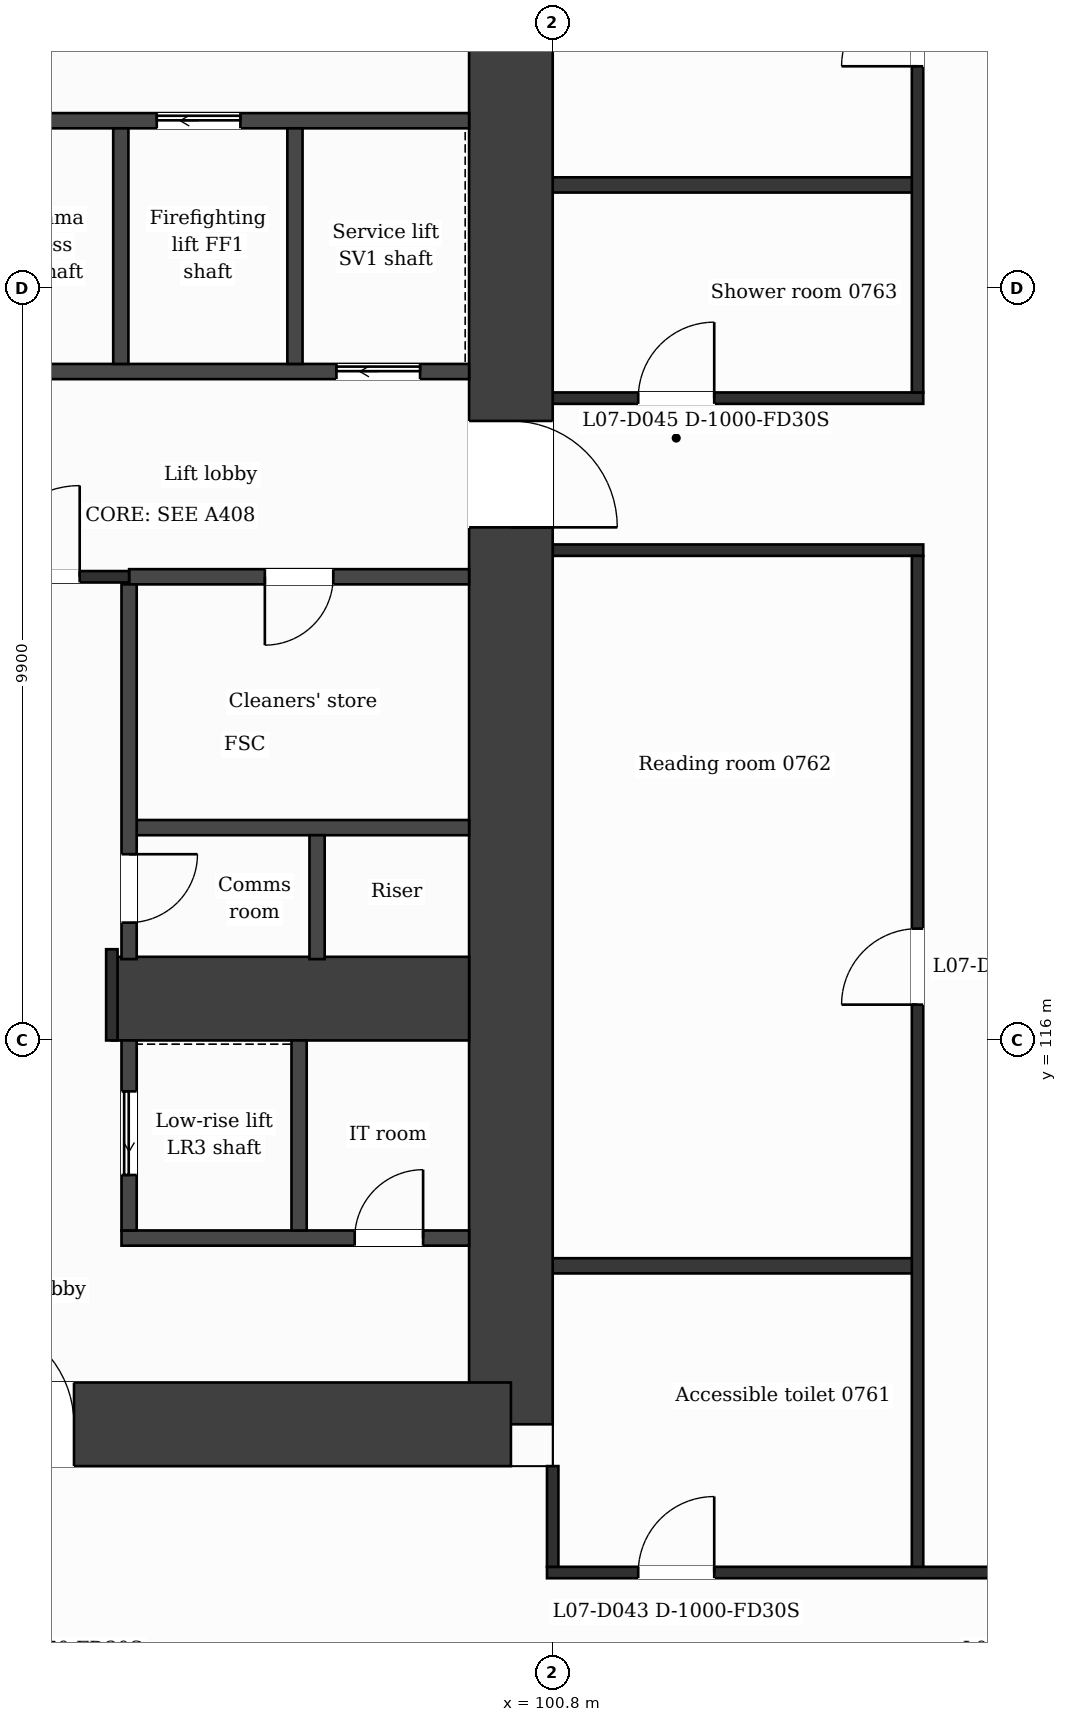
"""IFC4 building model, lengths in metres.
Left out: names, types, materials, properties, quantities, classifications, styles, units other than length and angle.
Written with IfcOpenShell. Run it as: python <this file> out.ifc"""

import sys

from ifc_helpers import new_model, si_unit, direction, frame, frame_2d, origin, place, context, subcontext, project, spatial, rectangle, extrude, element, fill, save


model = new_model("IFC4")
c1 = context("Model", 3, precision=1e-05, world=origin(), true_north=direction((0.0, 1.0)))
c2 = subcontext(c1, "Body", "Model", "MODEL_VIEW")
j1 = project(units=[si_unit("LENGTHUNIT", "METRE"), si_unit("PLANEANGLEUNIT", "RADIAN")], contexts=[c1])
p1 = place(None, origin())
s1 = spatial("IfcSite", under=j1, at=p1, CompositionType="ELEMENT")
p2 = place(p1, origin())
s2 = spatial("IfcBuilding", under=s1, at=p2, CompositionType="ELEMENT")
p3 = place(p2, frame((0.0, 0.0, 42.5)))
s3 = spatial("IfcBuildingStorey", under=s2, at=p3, CompositionType="ELEMENT", Elevation=42.5)
p4 = place(p3, frame((100.25, 131.85, 0.0), z_axis=(0.0, 0.0, 1.0), x_axis=(0.0, -1.0, 0.0)))
e1 = element("IfcWall", 1, at=p4, inside=s3, PredefinedType="SHEAR", context=c2, shape_type="SweptSolid", body=[
    extrude(rectangle(XDim=20.9, YDim=1.1, at=frame_2d((10.45, 0.0))), origin(), (0.0, 0.0, 1.0), 3.5),
])
p5 = place(p4, frame((7.7, 0.0, 0.0)))
e2 = element("IfcOpeningElement", 2, at=p5, cuts=e1, PredefinedType="OPENING", context=c2, shape_type="SweptSolid", body=[
    extrude(rectangle(XDim=1.4, YDim=2.1, at=frame_2d((0.7, 1.05))), frame((0.0, 0.56, 0.0), z_axis=(0.0, -1.0, 0.0), x_axis=(1.0, 0.0, 0.0)), (0.0, 0.0, 1.0), 1.12),
])
p6 = place(p3, frame((100.25, 110.95, 0.0), z_axis=(0.0, 0.0, 1.0), x_axis=(-1.0, 0.0, 0.0)))
e3 = element("IfcWall", 3, at=p6, inside=s3, PredefinedType="SHEAR", context=c2, shape_type="SweptSolid", body=[
    extrude(rectangle(XDim=13.952, YDim=1.1, at=frame_2d((6.976, 0.0))), origin(), (0.0, 0.0, 1.0), 3.5),
])
p7 = place(p6, frame((5.748, 0.0, 0.0)))
e4 = element("IfcOpeningElement", 4, at=p7, cuts=e3, PredefinedType="OPENING", context=c2, shape_type="SweptSolid", body=[
    extrude(rectangle(XDim=1.4, YDim=2.1, at=frame_2d((0.7, 1.05))), frame((0.0, 0.56, 0.0), z_axis=(0.0, -1.0, 0.0), x_axis=(1.0, 0.0, 0.0)), (0.0, 0.0, 1.0), 1.12),
])
p8 = place(p3, frame((95.0, 116.55, 0.0), z_axis=(0.0, 0.0, 1.0), x_axis=(1.0, 0.0, 0.0)))
e5 = element("IfcWall", 5, at=p8, inside=s3, PredefinedType="SHEAR", context=c2, shape_type="SweptSolid", body=[
    extrude(rectangle(XDim=4.7, YDim=1.1, at=frame_2d((2.35, 0.0))), origin(), (0.0, 0.0, 1.0), 3.5),
])
p9 = place(p3, frame((100.725, 109.0, 0.0), z_axis=(0.0, 0.0, 1.0), x_axis=(1.0, 0.0, 0.0)))
e6 = element("IfcWall", 6, at=p9, inside=s3, PredefinedType="PARTITIONING", context=c2, shape_type="SweptSolid", body=[
    extrude(rectangle(XDim=25.35, YDim=0.15, at=frame_2d((12.675, 0.0))), origin(), (0.0, 0.0, 1.0), 3.18),
])
p10 = place(p9, frame((1.2, 0.0, 0.0)))
e7 = element("IfcOpeningElement", 7, at=p10, cuts=e6, PredefinedType="OPENING", context=c2, shape_type="SweptSolid", body=[
    extrude(rectangle(XDim=1.0, YDim=2.1, at=frame_2d((0.5, 1.05))), frame((0.0, 0.085, 0.0), z_axis=(0.0, -1.0, 0.0), x_axis=(1.0, 0.0, 0.0)), (0.0, 0.0, 1.0), 0.17),
])
p11 = place(p9, frame((12.845, 0.0, 0.0)))
e8 = element("IfcOpeningElement", 8, at=p11, cuts=e6, PredefinedType="OPENING", context=c2, shape_type="SweptSolid", body=[
    extrude(rectangle(XDim=1.0, YDim=2.1, at=frame_2d((0.5, 1.05))), frame((0.0, 0.085, 0.0), z_axis=(0.0, -1.0, 0.0), x_axis=(1.0, 0.0, 0.0)), (0.0, 0.0, 1.0), 0.17),
])
p12 = place(p9, frame((23.15, 0.0, 0.0)))
e9 = element("IfcOpeningElement", 9, at=p12, cuts=e6, PredefinedType="OPENING", context=c2, shape_type="SweptSolid", body=[
    extrude(rectangle(XDim=1.0, YDim=2.1, at=frame_2d((0.5, 1.05))), frame((0.0, 0.085, 0.0), z_axis=(0.0, -1.0, 0.0), x_axis=(1.0, 0.0, 0.0)), (0.0, 0.0, 1.0), 0.17),
])
p13 = place(p3, frame((100.8, 113.035, 0.0), z_axis=(0.0, 0.0, 1.0), x_axis=(1.0, 0.0, 0.0)))
e10 = element("IfcWall", 10, at=p13, inside=s3, PredefinedType="PARTITIONING", context=c2, shape_type="SweptSolid", body=[
    extrude(rectangle(XDim=4.8, YDim=0.2, at=frame_2d((2.4, 0.0))), origin(), (0.0, 0.0, 1.0), 3.18),
])
p14 = place(p3, frame((95.127, 113.4, 0.0), z_axis=(0.0, 0.0, 1.0), x_axis=(1.0, 0.0, 0.0)))
e11 = element("IfcWall", 11, at=p14, inside=s3, PredefinedType="PARTITIONING", context=c2, shape_type="SweptSolid", body=[
    extrude(rectangle(XDim=4.573, YDim=0.2, at=frame_2d((2.287, 0.0))), origin(), (0.0, 0.0, 1.0), 3.18),
])
p15 = place(p14, frame((3.068, 0.0, 0.0)))
e12 = element("IfcOpeningElement", 12, at=p15, cuts=e11, PredefinedType="OPENING", context=c2, shape_type="SweptSolid", body=[
    extrude(rectangle(XDim=0.9, YDim=2.1, at=frame_2d((0.45, 1.05))), frame((0.0, 0.11, 0.0), z_axis=(0.0, -1.0, 0.0), x_axis=(1.0, 0.0, 0.0)), (0.0, 0.0, 1.0), 0.22),
])
p16 = place(p3, frame((95.227, 118.8, 0.0), z_axis=(0.0, 0.0, 1.0), x_axis=(1.0, 0.0, 0.0)))
e13 = element("IfcWall", 13, at=p16, inside=s3, PredefinedType="PARTITIONING", context=c2, shape_type="SweptSolid", body=[
    extrude(rectangle(XDim=4.473, YDim=0.2, at=frame_2d((2.236, 0.0))), origin(), (0.0, 0.0, 1.0), 3.18),
])
p17 = place(p3, frame((95.227, 122.1, 0.0), z_axis=(0.0, 0.0, 1.0), x_axis=(1.0, 0.0, 0.0)))
e14 = element("IfcWall", 14, at=p17, inside=s3, PredefinedType="PARTITIONING", context=c2, shape_type="SweptSolid", body=[
    extrude(rectangle(XDim=4.473, YDim=0.2, at=frame_2d((2.236, 0.0))), origin(), (0.0, 0.0, 1.0), 3.18),
])
p18 = place(p17, frame((1.786, 0.0, 0.0)))
e15 = element("IfcOpeningElement", 15, at=p18, cuts=e14, PredefinedType="OPENING", context=c2, shape_type="SweptSolid", body=[
    extrude(rectangle(XDim=0.9, YDim=2.1, at=frame_2d((0.45, 1.05))), frame((0.0, 0.11, 0.0), z_axis=(0.0, -1.0, 0.0), x_axis=(1.0, 0.0, 0.0)), (0.0, 0.0, 1.0), 0.22),
])
p19 = place(p3, frame((92.827, 122.1, 0.0), z_axis=(0.0, 0.0, 1.0), x_axis=(1.0, 0.0, 0.0)))
e16 = element("IfcWall", 16, at=p19, inside=s3, PredefinedType="PARTITIONING", context=c2, shape_type="SweptSolid", body=[
    extrude(rectangle(XDim=2.4, YDim=0.15, at=frame_2d((1.2, 0.0))), origin(), (0.0, 0.0, 1.0), 3.18),
])
p20 = place(p19, frame((0.55, 0.0, 0.0)))
e17 = element("IfcOpeningElement", 17, at=p20, cuts=e16, PredefinedType="OPENING", context=c2, shape_type="SweptSolid", body=[
    extrude(rectangle(XDim=1.2, YDim=2.1, at=frame_2d((0.6, 1.05))), frame((0.0, 0.085, 0.0), z_axis=(0.0, -1.0, 0.0), x_axis=(1.0, 0.0, 0.0)), (0.0, 0.0, 1.0), 0.17),
])
p21 = place(p3, frame((100.8, 122.45, 0.0), z_axis=(0.0, 0.0, 1.0), x_axis=(1.0, 0.0, 0.0)))
e18 = element("IfcWall", 18, at=p21, inside=s3, PredefinedType="PARTITIONING", context=c2, shape_type="SweptSolid", body=[
    extrude(rectangle(XDim=4.875, YDim=0.15, at=frame_2d((2.438, 0.0))), origin(), (0.0, 0.0, 1.0), 3.18),
])
p22 = place(p3, frame((100.8, 124.45, 0.0), z_axis=(0.0, 0.0, 1.0), x_axis=(1.0, 0.0, 0.0)))
e19 = element("IfcWall", 19, at=p22, inside=s3, PredefinedType="PARTITIONING", context=c2, shape_type="SweptSolid", body=[
    extrude(rectangle(XDim=4.875, YDim=0.15, at=frame_2d((2.438, 0.0))), origin(), (0.0, 0.0, 1.0), 3.18),
])
p23 = place(p22, frame((1.125, 0.0, 0.0)))
e20 = element("IfcOpeningElement", 20, at=p23, cuts=e19, PredefinedType="OPENING", context=c2, shape_type="SweptSolid", body=[
    extrude(rectangle(XDim=1.0, YDim=2.1, at=frame_2d((0.5, 1.05))), frame((0.0, 0.085, 0.0), z_axis=(0.0, -1.0, 0.0), x_axis=(1.0, 0.0, 0.0)), (0.0, 0.0, 1.0), 0.17),
])
p24 = place(p3, frame((92.702, 124.8, 0.0), z_axis=(0.0, 0.0, 1.0), x_axis=(1.0, 0.0, 0.0)))
e21 = element("IfcWall", 21, at=p24, inside=s3, PredefinedType="PARTITIONING", context=c2, shape_type="SweptSolid", body=[
    extrude(rectangle(XDim=6.998, YDim=0.2, at=frame_2d((3.499, 0.0))), origin(), (0.0, 0.0, 1.0), 3.18),
])
p25 = place(p24, frame((5.253, 0.0, 0.0)))
e22 = element("IfcOpeningElement", 22, at=p25, cuts=e21, PredefinedType="OPENING", context=c2, shape_type="SweptSolid", body=[
    extrude(rectangle(XDim=1.1, YDim=2.1, at=frame_2d((0.55, 1.05))), frame((0.0, 0.11, 0.0), z_axis=(0.0, -1.0, 0.0), x_axis=(1.0, 0.0, 0.0)), (0.0, 0.0, 1.0), 0.22),
])
p26 = place(p3, frame((100.8, 127.255, 0.0), z_axis=(0.0, 0.0, 1.0), x_axis=(1.0, 0.0, 0.0)))
e23 = element("IfcWall", 23, at=p26, inside=s3, PredefinedType="PARTITIONING", context=c2, shape_type="SweptSolid", body=[
    extrude(rectangle(XDim=4.8, YDim=0.2, at=frame_2d((2.4, 0.0))), origin(), (0.0, 0.0, 1.0), 3.18),
])
p27 = place(p3, frame((92.827, 128.1, 0.0), z_axis=(0.0, 0.0, 1.0), x_axis=(1.0, 0.0, 0.0)))
e24 = element("IfcWall", 24, at=p27, inside=s3, PredefinedType="PARTITIONING", context=c2, shape_type="SweptSolid", body=[
    extrude(rectangle(XDim=6.873, YDim=0.2, at=frame_2d((3.437, 0.0))), origin(), (0.0, 0.0, 1.0), 3.18),
])
p28 = place(p27, frame((2.764, 0.0, 0.0)))
e25 = element("IfcOpeningElement", 25, at=p28, cuts=e24, PredefinedType="OPENING", context=c2, shape_type="SweptSolid", body=[
    extrude(rectangle(XDim=1.1, YDim=2.1, at=frame_2d((0.55, 1.05))), frame((0.0, 0.11, 0.0), z_axis=(0.0, -1.0, 0.0), x_axis=(1.0, 0.0, 0.0)), (0.0, 0.0, 1.0), 0.22),
])
p29 = place(p3, frame((95.0, 116.0, 0.0), z_axis=(0.0, 0.0, 1.0), x_axis=(0.0, 1.0, 0.0)))
e26 = element("IfcWall", 26, at=p29, inside=s3, PredefinedType="PARTITIONING", context=c2, shape_type="SweptSolid", body=[
    extrude(rectangle(XDim=1.2, YDim=0.15, at=frame_2d((0.6, 0.0))), origin(), (0.0, 0.0, 1.0), 3.18),
])
p30 = place(p3, frame((95.118, 124.9, 0.0), z_axis=(0.0, 0.0, 1.0), x_axis=(0.0, 1.0, 0.0)))
e27 = element("IfcWall", 27, at=p30, inside=s3, PredefinedType="PARTITIONING", context=c2, shape_type="SweptSolid", body=[
    extrude(rectangle(XDim=3.1, YDim=0.2, at=frame_2d((1.55, 0.0))), origin(), (0.0, 0.0, 1.0), 3.18),
])
p31 = place(p3, frame((95.227, 113.5, 0.0), z_axis=(0.0, 0.0, 1.0), x_axis=(0.0, 1.0, 0.0)))
e28 = element("IfcWall", 28, at=p31, inside=s3, PredefinedType="PARTITIONING", context=c2, shape_type="SweptSolid", body=[
    extrude(rectangle(XDim=2.5, YDim=0.2, at=frame_2d((1.25, 0.0))), origin(), (0.0, 0.0, 1.0), 3.18),
])
p32 = place(p31, frame((0.73, 0.0, 0.0)))
e29 = element("IfcOpeningElement", 29, at=p32, cuts=e28, PredefinedType="OPENING", context=c2, shape_type="SweptSolid", body=[
    extrude(rectangle(XDim=1.1, YDim=2.1, at=frame_2d((0.55, 1.05))), frame((0.0, 0.11, 0.0), z_axis=(0.0, -1.0, 0.0), x_axis=(1.0, 0.0, 0.0)), (0.0, 0.0, 1.0), 0.22),
])
p33 = place(p3, frame((95.227, 117.07, 0.0), z_axis=(0.0, 0.0, 1.0), x_axis=(0.0, 1.0, 0.0)))
e30 = element("IfcWall", 30, at=p33, inside=s3, PredefinedType="PARTITIONING", context=c2, shape_type="SweptSolid", body=[
    extrude(rectangle(XDim=4.93, YDim=0.2, at=frame_2d((2.465, 0.0))), origin(), (0.0, 0.0, 1.0), 3.18),
])
p34 = place(p33, frame((0.48, 0.0, 0.0)))
e31 = element("IfcOpeningElement", 31, at=p34, cuts=e30, PredefinedType="OPENING", context=c2, shape_type="SweptSolid", body=[
    extrude(rectangle(XDim=0.9, YDim=2.1, at=frame_2d((0.45, 1.05))), frame((0.0, 0.11, 0.0), z_axis=(0.0, -1.0, 0.0), x_axis=(1.0, 0.0, 0.0)), (0.0, 0.0, 1.0), 0.22),
])
p35 = place(p3, frame((97.409, 124.9, 0.0), z_axis=(0.0, 0.0, 1.0), x_axis=(0.0, 1.0, 0.0)))
e32 = element("IfcWall", 32, at=p35, inside=s3, PredefinedType="PARTITIONING", context=c2, shape_type="SweptSolid", body=[
    extrude(rectangle(XDim=3.1, YDim=0.2, at=frame_2d((1.55, 0.0))), origin(), (0.0, 0.0, 1.0), 3.18),
])
p36 = place(p3, frame((97.463, 113.5, 0.0), z_axis=(0.0, 0.0, 1.0), x_axis=(0.0, 1.0, 0.0)))
e33 = element("IfcWall", 33, at=p36, inside=s3, PredefinedType="PARTITIONING", context=c2, shape_type="SweptSolid", body=[
    extrude(rectangle(XDim=2.5, YDim=0.2, at=frame_2d((1.25, 0.0))), origin(), (0.0, 0.0, 1.0), 3.18),
])
p37 = place(p3, frame((97.7, 117.07, 0.0), z_axis=(0.0, 0.0, 1.0), x_axis=(0.0, 1.0, 0.0)))
e34 = element("IfcWall", 34, at=p37, inside=s3, PredefinedType="PARTITIONING", context=c2, shape_type="SweptSolid", body=[
    extrude(rectangle(XDim=1.63, YDim=0.2, at=frame_2d((0.815, 0.0))), origin(), (0.0, 0.0, 1.0), 3.18),
])
p38 = place(p3, frame((100.8, 109.075, 0.0), z_axis=(0.0, 0.0, 1.0), x_axis=(0.0, 1.0, 0.0)))
e35 = element("IfcWall", 35, at=p38, inside=s3, PredefinedType="PARTITIONING", context=c2, shape_type="SweptSolid", body=[
    extrude(rectangle(XDim=1.325, YDim=0.15, at=frame_2d((0.663, 0.0))), origin(), (0.0, 0.0, 1.0), 3.18),
])
p39 = place(p3, frame((105.6, 109.075, 0.0), z_axis=(0.0, 0.0, 1.0), x_axis=(0.0, 1.0, 0.0)))
e36 = element("IfcWall", 36, at=p39, inside=s3, PredefinedType="PARTITIONING", context=c2, shape_type="SweptSolid", body=[
    extrude(rectangle(XDim=13.3, YDim=0.15, at=frame_2d((6.65, 0.0))), origin(), (0.0, 0.0, 1.0), 3.18),
])
p40 = place(p39, frame((7.396, 0.0, 0.0)))
e37 = element("IfcOpeningElement", 37, at=p40, cuts=e36, PredefinedType="OPENING", context=c2, shape_type="SweptSolid", body=[
    extrude(rectangle(XDim=1.0, YDim=2.1, at=frame_2d((0.5, 1.05))), frame((0.0, 0.085, 0.0), z_axis=(0.0, -1.0, 0.0), x_axis=(1.0, 0.0, 0.0)), (0.0, 0.0, 1.0), 0.17),
])
p41 = place(p3, frame((105.6, 124.525, 0.0), z_axis=(0.0, 0.0, 1.0), x_axis=(0.0, 1.0, 0.0)))
e38 = element("IfcWall", 38, at=p41, inside=s3, PredefinedType="PARTITIONING", context=c2, shape_type="SweptSolid", body=[
    extrude(rectangle(XDim=9.2, YDim=0.15, at=frame_2d((4.6, 0.0))), origin(), (0.0, 0.0, 1.0), 3.18),
])
p42 = place(p41, frame((4.291, 0.0, 0.0)))
e39 = element("IfcOpeningElement", 39, at=p42, cuts=e38, PredefinedType="OPENING", context=c2, shape_type="SweptSolid", body=[
    extrude(rectangle(XDim=1.0, YDim=2.1, at=frame_2d((0.5, 1.05))), frame((0.0, 0.085, 0.0), z_axis=(0.0, -1.0, 0.0), x_axis=(1.0, 0.0, 0.0)), (0.0, 0.0, 1.0), 0.17),
])
p43 = place(p20, origin())
e40 = element("IfcDoor", 40, at=p43, inside=s3, OperationType="SINGLE_SWING_RIGHT", PredefinedType="DOOR", context=c2, shape_type="SweptSolid", body=[
    extrude(rectangle(XDim=1.2, YDim=2.1, at=frame_2d((0.6, 1.05))), frame((0.0, 0.025, 0.0), z_axis=(0.0, -1.0, 0.0), x_axis=(1.0, 0.0, 0.0)), (0.0, 0.0, 1.0), 0.05),
])
fill(e17, e40)
p44 = place(p28, origin())
e41 = element("IfcDoor", 41, at=p44, inside=s3, OperationType="SLIDING_TO_LEFT", PredefinedType="DOOR", context=c2, shape_type="SweptSolid", body=[
    extrude(rectangle(XDim=1.1, YDim=2.1, at=frame_2d((0.55, 1.05))), frame((0.0, 0.025, 0.0), z_axis=(0.0, -1.0, 0.0), x_axis=(1.0, 0.0, 0.0)), (0.0, 0.0, 1.0), 0.05),
])
fill(e25, e41)
p45 = place(p25, origin())
e42 = element("IfcDoor", 42, at=p45, inside=s3, OperationType="SLIDING_TO_LEFT", PredefinedType="DOOR", context=c2, shape_type="SweptSolid", body=[
    extrude(rectangle(XDim=1.1, YDim=2.1, at=frame_2d((0.55, 1.05))), frame((0.0, 0.025, 0.0), z_axis=(0.0, -1.0, 0.0), x_axis=(1.0, 0.0, 0.0)), (0.0, 0.0, 1.0), 0.05),
])
fill(e22, e42)
p46 = place(p18, origin())
e43 = element("IfcDoor", 43, at=p46, inside=s3, OperationType="SINGLE_SWING_LEFT", PredefinedType="DOOR", context=c2, shape_type="SweptSolid", body=[
    extrude(rectangle(XDim=0.9, YDim=2.1, at=frame_2d((0.45, 1.05))), frame((0.0, 0.025, 0.0), z_axis=(0.0, -1.0, 0.0), x_axis=(1.0, 0.0, 0.0)), (0.0, 0.0, 1.0), 0.05),
])
fill(e15, e43)
p47 = place(p34, origin())
e44 = element("IfcDoor", 44, at=p47, inside=s3, OperationType="SINGLE_SWING_RIGHT", PredefinedType="DOOR", context=c2, shape_type="SweptSolid", body=[
    extrude(rectangle(XDim=0.9, YDim=2.1, at=frame_2d((0.45, 1.05))), frame((0.0, 0.025, 0.0), z_axis=(0.0, -1.0, 0.0), x_axis=(1.0, 0.0, 0.0)), (0.0, 0.0, 1.0), 0.05),
])
fill(e31, e44)
p48 = place(p32, origin())
e45 = element("IfcDoor", 45, at=p48, inside=s3, OperationType="SLIDING_TO_LEFT", PredefinedType="DOOR", context=c2, shape_type="SweptSolid", body=[
    extrude(rectangle(XDim=1.1, YDim=2.1, at=frame_2d((0.55, 1.05))), frame((0.0, 0.025, 0.0), z_axis=(0.0, -1.0, 0.0), x_axis=(1.0, 0.0, 0.0)), (0.0, 0.0, 1.0), 0.05),
])
fill(e29, e45)
p49 = place(p15, origin())
e46 = element("IfcDoor", 46, at=p49, inside=s3, OperationType="SINGLE_SWING_RIGHT", PredefinedType="DOOR", context=c2, shape_type="SweptSolid", body=[
    extrude(rectangle(XDim=0.9, YDim=2.1, at=frame_2d((0.45, 1.05))), frame((0.0, 0.025, 0.0), z_axis=(0.0, -1.0, 0.0), x_axis=(1.0, 0.0, 0.0)), (0.0, 0.0, 1.0), 0.05),
])
fill(e12, e46)
p50 = place(p10, origin())
e47 = element("IfcDoor", 47, at=p50, inside=s3, OperationType="SINGLE_SWING_RIGHT", PredefinedType="DOOR", context=c2, shape_type="SweptSolid", body=[
    extrude(rectangle(XDim=1.0, YDim=2.1, at=frame_2d((0.5, 1.05))), frame((0.0, 0.025, 0.0), z_axis=(0.0, -1.0, 0.0), x_axis=(1.0, 0.0, 0.0)), (0.0, 0.0, 1.0), 0.05),
])
fill(e7, e47)
p51 = place(p40, origin())
e48 = element("IfcDoor", 48, at=p51, inside=s3, OperationType="SINGLE_SWING_LEFT", PredefinedType="DOOR", context=c2, shape_type="SweptSolid", body=[
    extrude(rectangle(XDim=1.0, YDim=2.1, at=frame_2d((0.5, 1.05))), frame((0.0, 0.025, 0.0), z_axis=(0.0, -1.0, 0.0), x_axis=(1.0, 0.0, 0.0)), (0.0, 0.0, 1.0), 0.05),
])
fill(e37, e48)
p52 = place(p23, origin())
e49 = element("IfcDoor", 49, at=p52, inside=s3, OperationType="SINGLE_SWING_RIGHT", PredefinedType="DOOR", context=c2, shape_type="SweptSolid", body=[
    extrude(rectangle(XDim=1.0, YDim=2.1, at=frame_2d((0.5, 1.05))), frame((0.0, 0.025, 0.0), z_axis=(0.0, -1.0, 0.0), x_axis=(1.0, 0.0, 0.0)), (0.0, 0.0, 1.0), 0.05),
])
fill(e20, e49)
p53 = place(p42, origin())
e50 = element("IfcDoor", 50, at=p53, inside=s3, OperationType="SINGLE_SWING_LEFT", PredefinedType="DOOR", context=c2, shape_type="SweptSolid", body=[
    extrude(rectangle(XDim=1.0, YDim=2.1, at=frame_2d((0.5, 1.05))), frame((0.0, 0.025, 0.0), z_axis=(0.0, -1.0, 0.0), x_axis=(1.0, 0.0, 0.0)), (0.0, 0.0, 1.0), 0.05),
])
fill(e39, e50)
p54 = place(p7, origin())
e51 = element("IfcDoor", 51, at=p54, inside=s3, OperationType="SINGLE_SWING_RIGHT", PredefinedType="DOOR", context=c2, shape_type="SweptSolid", body=[
    extrude(rectangle(XDim=1.4, YDim=2.1, at=frame_2d((0.7, 1.05))), frame((0.0, 0.025, 0.0), z_axis=(0.0, -1.0, 0.0), x_axis=(1.0, 0.0, 0.0)), (0.0, 0.0, 1.0), 0.05),
])
fill(e4, e51)
p55 = place(p5, origin())
e52 = element("IfcDoor", 52, at=p55, inside=s3, OperationType="SINGLE_SWING_RIGHT", PredefinedType="DOOR", context=c2, shape_type="SweptSolid", body=[
    extrude(rectangle(XDim=1.4, YDim=2.1, at=frame_2d((0.7, 1.05))), frame((0.0, 0.025, 0.0), z_axis=(0.0, -1.0, 0.0), x_axis=(1.0, 0.0, 0.0)), (0.0, 0.0, 1.0), 0.05),
])
fill(e2, e52)
save(model, sys.argv[1])
